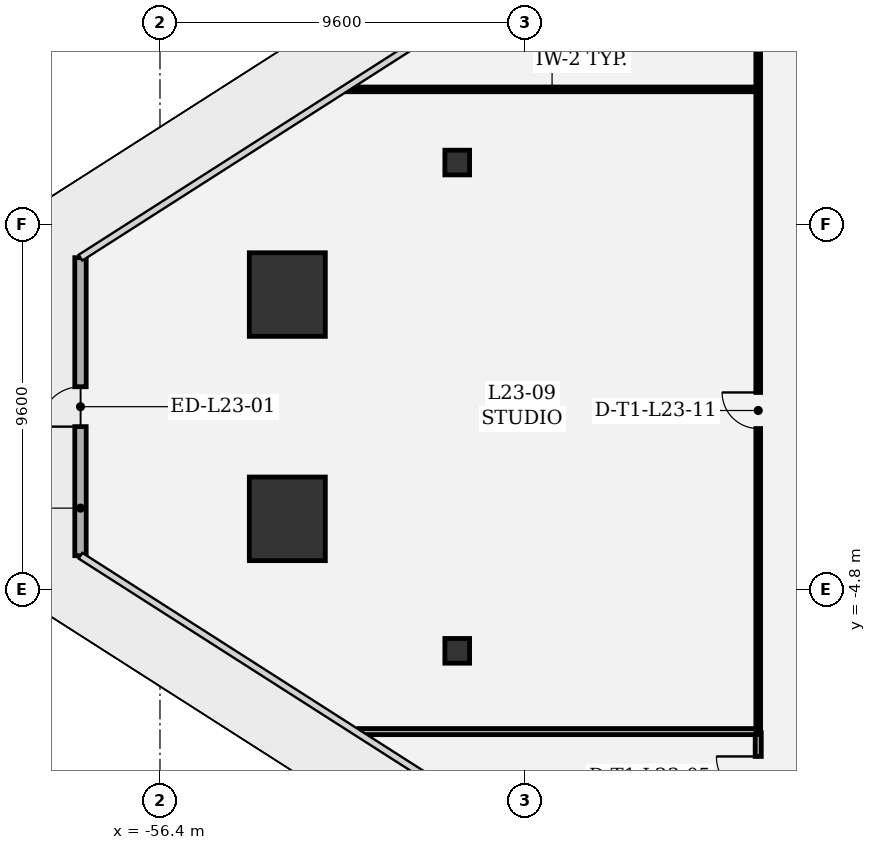
"""IFC4 building model, lengths in metres.
Left out: names, types, materials, properties, quantities, classifications, styles, units other than length and angle.
Written with IfcOpenShell. Run it as: python <this file> out.ifc"""

import sys

from ifc_helpers import new_model, si_unit, direction, frame, frame_2d, origin, origin_2d, place, context, subcontext, project, spatial, rectangle, extrude, element, fill, save


model = new_model("IFC4")
c1 = context("Model", 3, precision=1e-05, world=origin(), true_north=direction((0.0, 1.0)))
c2 = subcontext(c1, "Body", "Model", "MODEL_VIEW")
j1 = project(units=[si_unit("LENGTHUNIT", "METRE"), si_unit("PLANEANGLEUNIT", "RADIAN")], contexts=[c1])
p1 = place(None, origin())
s1 = spatial("IfcSite", under=j1, at=p1, CompositionType="ELEMENT")
p2 = place(p1, origin())
s2 = spatial("IfcBuilding", under=s1, at=p2, CompositionType="ELEMENT")
p3 = place(p2, frame((0.0, 0.0, 105.0)))
s3 = spatial("IfcBuildingStorey", under=s2, at=p3, CompositionType="ELEMENT", Elevation=105.0)
for number, where, z_axis, x_axis in (
    (1, (-53.049, 2.951, 0.0), (0.0, 0.0, 1.0), (1.0, 0.0, 0.0)),
    (2, (-53.049, -2.951, 0.0), (0.0, 0.0, 1.0), (1.0, 0.0, 0.0)),
):
    element("IfcColumn", number, at=place(p3, frame(where, z_axis=z_axis, x_axis=x_axis)), inside=s3, PredefinedType="COLUMN", context=c2, shape_type="SweptSolid", body=[
        extrude(rectangle(XDim=2.0, YDim=2.2, at=origin_2d()), origin(), (0.0, 0.0, 1.0), 4.8),
    ])
for number, where, z_axis, x_axis in (
    (3, (-48.578, 6.425, 0.0), (0.0, 0.0, 1.0), (1.0, 0.0, 0.0)),
    (4, (-48.578, -6.425, 0.0), (0.0, 0.0, 1.0), (1.0, 0.0, 0.0)),
):
    element("IfcColumn", number, at=place(p3, frame(where, z_axis=z_axis, x_axis=x_axis)), inside=s3, PredefinedType="COLUMN", context=c2, shape_type="SweptSolid", body=[
        extrude(rectangle(XDim=0.65, YDim=0.65, at=origin_2d()), origin(), (0.0, 0.0, 1.0), 4.8),
    ])
p4 = place(p3, frame((-58.492, -3.921, 0.0), z_axis=(0.0, 0.0, 1.0), x_axis=(0.0, 1.0, 0.0)))
e5 = element("IfcWall", 5, at=p4, inside=s3, PredefinedType="SOLIDWALL", context=c2, shape_type="SweptSolid", body=[
    extrude(rectangle(XDim=7.843, YDim=0.3, at=frame_2d((3.921, 0.0))), origin(), (0.0, 0.0, 1.0), 4.52),
])
p5 = place(p4, frame((3.396, 0.0, 0.0)))
e6 = element("IfcOpeningElement", 6, at=p5, cuts=e5, PredefinedType="OPENING", context=c2, shape_type="SweptSolid", body=[
    extrude(rectangle(XDim=1.05, YDim=2.2, at=frame_2d((0.525, 1.1))), frame((0.0, 0.16, 0.0), z_axis=(0.0, -1.0, 0.0), x_axis=(1.0, 0.0, 0.0)), (0.0, 0.0, 1.0), 0.32),
])
p6 = place(p3, frame((-51.482, 8.35, 0.0), z_axis=(0.0, 0.0, 1.0), x_axis=(1.0, 0.0, 0.0)))
e7 = element("IfcWall", 7, at=p6, inside=s3, PredefinedType="PARTITIONING", context=c2, shape_type="SweptSolid", body=[
    extrude(rectangle(XDim=10.799, YDim=0.125, at=frame_2d((5.4, 0.0))), origin(), (0.0, 0.0, 1.0), 3.64),
])
p7 = place(p3, frame((-40.658, 10.733, 0.0), z_axis=(0.0, 0.0, 1.0), x_axis=(0.0, -1.0, 0.0)))
e8 = element("IfcWall", 8, at=p7, inside=s3, PredefinedType="PARTITIONING", context=c2, shape_type="SweptSolid", body=[
    extrude(rectangle(XDim=2.358, YDim=0.125, at=frame_2d((1.179, 0.0))), origin(), (0.0, 0.0, 1.0), 4.52),
])
p8 = place(p3, frame((-40.658, -10.933, 0.0), z_axis=(0.0, 0.0, 1.0), x_axis=(0.0, 1.0, 0.0)))
e9 = element("IfcWall", 9, at=p8, inside=s3, PredefinedType="PARTITIONING", context=c2, shape_type="SweptSolid", body=[
    extrude(rectangle(XDim=2.358, YDim=0.16, at=frame_2d((1.179, 0.0))), origin(), (0.0, 0.0, 1.0), 4.52),
])
p9 = place(p8, frame((0.629, 0.0, 0.0)))
e10 = element("IfcOpeningElement", 10, at=p9, cuts=e9, PredefinedType="OPENING", context=c2, shape_type="SweptSolid", body=[
    extrude(rectangle(XDim=1.1, YDim=2.15, at=frame_2d((0.55, 1.075))), frame((0.0, 0.09, 0.0), z_axis=(0.0, -1.0, 0.0), x_axis=(1.0, 0.0, 0.0)), (0.0, 0.0, 1.0), 0.18),
])
p10 = place(p3, frame((-40.683, -8.55, 0.0), z_axis=(0.0, 0.0, 1.0), x_axis=(-1.0, 0.0, 0.0)))
e11 = element("IfcWall", 11, at=p10, inside=s3, PredefinedType="PARTITIONING", context=c2, shape_type="SweptSolid", body=[
    extrude(rectangle(XDim=10.487, YDim=0.16, at=frame_2d((5.243, 0.0))), origin(), (0.0, 0.0, 1.0), 3.64),
])
p11 = place(p3, frame((-40.658, -8.517, 0.0), z_axis=(0.0, 0.0, 1.0), x_axis=(0.0, 1.0, 0.0)))
e12 = element("IfcWall", 12, at=p11, inside=s3, PredefinedType="PARTITIONING", context=c2, shape_type="SweptSolid", body=[
    extrude(rectangle(XDim=16.834, YDim=0.125, at=frame_2d((8.417, 0.0))), origin(), (0.0, 0.0, 1.0), 4.52),
])
p12 = place(p11, frame((7.942, 0.0, 0.0)))
e13 = element("IfcOpeningElement", 13, at=p12, cuts=e12, PredefinedType="OPENING", context=c2, shape_type="SweptSolid", body=[
    extrude(rectangle(XDim=0.95, YDim=2.15, at=frame_2d((0.475, 1.075))), frame((0.0, 0.073, 0.0), z_axis=(0.0, -1.0, 0.0), x_axis=(1.0, 0.0, 0.0)), (0.0, 0.0, 1.0), 0.145),
])
p13 = place(p5, origin())
e14 = element("IfcDoor", 14, at=p13, inside=s3, OperationType="SINGLE_SWING_LEFT", PredefinedType="DOOR", context=c2, shape_type="SweptSolid", body=[
    extrude(rectangle(XDim=1.05, YDim=2.2, at=frame_2d((0.525, 1.1))), frame((0.0, 0.025, 0.0), z_axis=(0.0, -1.0, 0.0), x_axis=(1.0, 0.0, 0.0)), (0.0, 0.0, 1.0), 0.05),
])
fill(e6, e14)
p14 = place(p9, origin())
e15 = element("IfcDoor", 15, at=p14, inside=s3, OperationType="SINGLE_SWING_RIGHT", PredefinedType="DOOR", context=c2, shape_type="SweptSolid", body=[
    extrude(rectangle(XDim=1.1, YDim=2.15, at=frame_2d((0.55, 1.075))), frame((0.0, 0.025, 0.0), z_axis=(0.0, -1.0, 0.0), x_axis=(1.0, 0.0, 0.0)), (0.0, 0.0, 1.0), 0.05),
])
fill(e10, e15)
p15 = place(p12, origin())
e16 = element("IfcDoor", 16, at=p15, inside=s3, OperationType="SINGLE_SWING_RIGHT", PredefinedType="DOOR", context=c2, shape_type="SweptSolid", body=[
    extrude(rectangle(XDim=0.95, YDim=2.15, at=frame_2d((0.475, 1.075))), frame((0.0, 0.025, 0.0), z_axis=(0.0, -1.0, 0.0), x_axis=(1.0, 0.0, 0.0)), (0.0, 0.0, 1.0), 0.05),
])
fill(e13, e16)
save(model, sys.argv[1])
